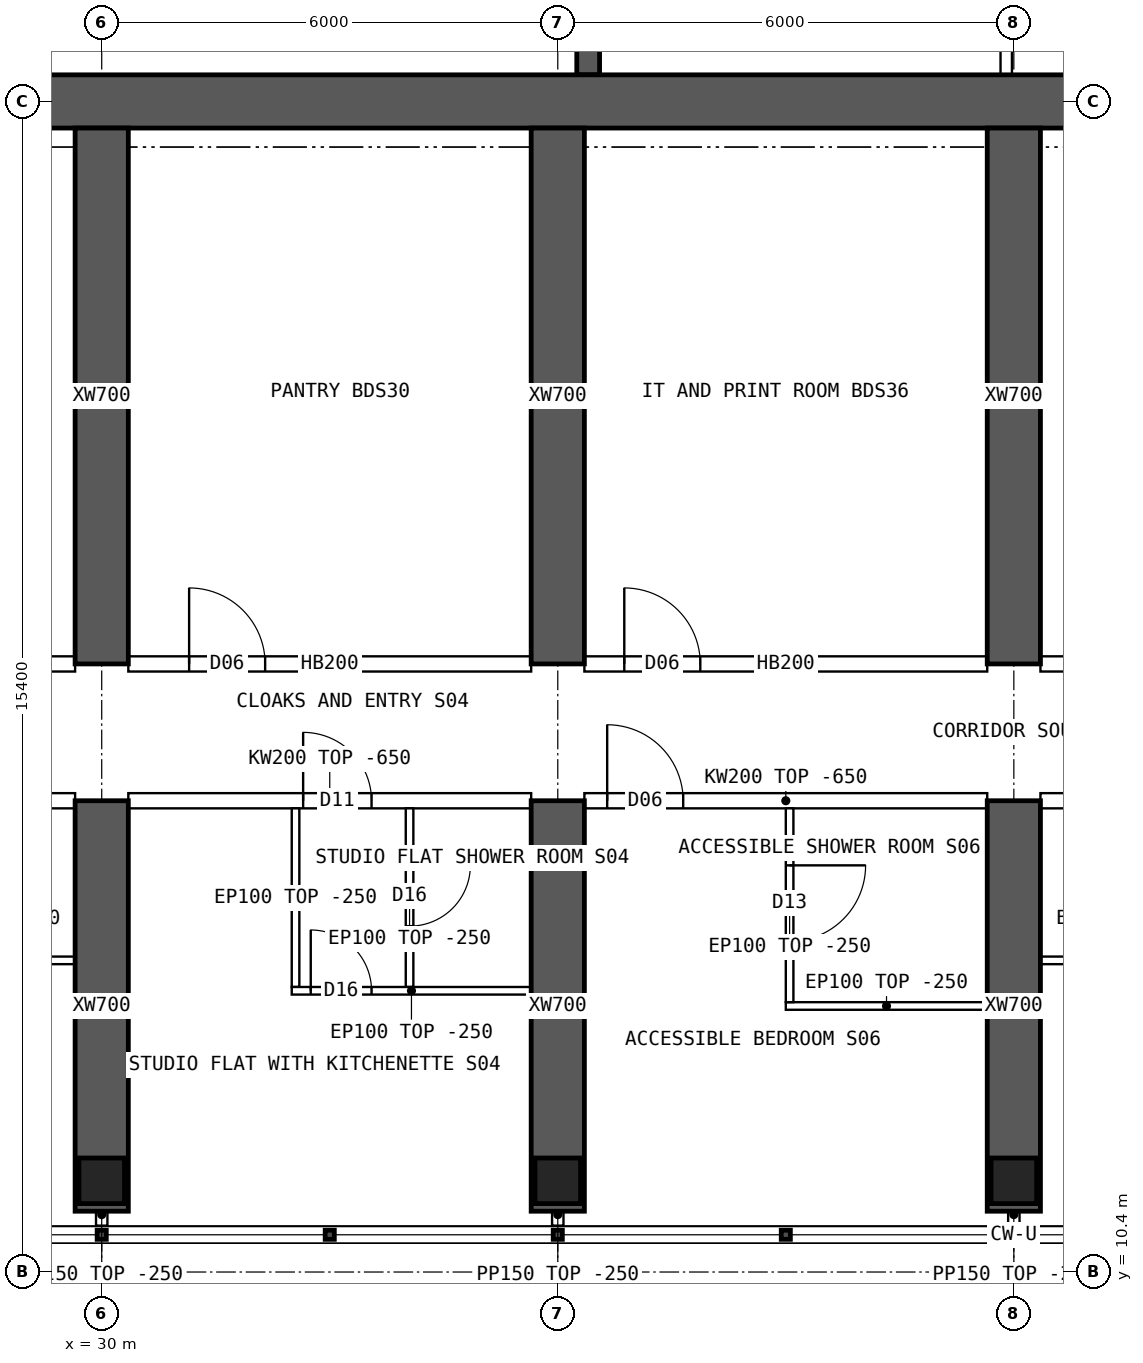
"""IFC4 building model, lengths in metres.
Left out: names, types, materials, properties, quantities, classifications, styles, units other than length and angle.
Written with IfcOpenShell. Run it as: python <this file> out.ifc"""

import sys

from ifc_helpers import new_model, si_unit, direction, frame, frame_2d, origin, origin_2d, place, context, subcontext, project, spatial, polyline, rectangle, hollow_rectangle, outline, extrude, element, fill, save


model = new_model("IFC4")
c1 = context("Model", 3, precision=1e-05, world=origin(), true_north=direction((0.0, 1.0)))
c2 = subcontext(c1, "Body", "Model", "MODEL_VIEW")
j1 = project(units=[si_unit("LENGTHUNIT", "METRE"), si_unit("PLANEANGLEUNIT", "RADIAN")], contexts=[c1])
p1 = place(None, origin())
s1 = spatial("IfcSite", under=j1, at=p1, CompositionType="ELEMENT")
p2 = place(p1, origin())
s2 = spatial("IfcBuilding", under=s1, at=p2, CompositionType="ELEMENT")
p3 = place(p2, frame((0.0, 0.0, 231.55)))
s3 = spatial("IfcBuildingStorey", under=s2, at=p3, CompositionType="ELEMENT", Elevation=231.55)
for number, where, z_axis, x_axis in (
    (1, (30.0, 11.6, 0.0), (0.0, 0.0, 1.0), (1.0, 0.0, 0.0)),
    (2, (36.0, 11.6, 0.0), (0.0, 0.0, 1.0), (1.0, 0.0, 0.0)),
    (3, (42.0, 11.6, 0.0), (0.0, 0.0, 1.0), (1.0, 0.0, 0.0)),
):
    element("IfcColumn", number, at=place(p3, frame(where, z_axis=z_axis, x_axis=x_axis)), inside=s3, PredefinedType="COLUMN", context=c2, shape_type="SweptSolid", body=[
        extrude(hollow_rectangle(XDim=0.6, YDim=0.6, WallThickness=0.06, at=origin_2d()), origin(), (0.0, 0.0, 1.0), 3.75),
    ])
p4 = place(p3, frame((18.0, 25.8, 0.0), z_axis=(0.0, 0.0, 1.0), x_axis=(1.0, 0.0, 0.0)))
e4 = element("IfcWall", 4, at=p4, inside=s3, PredefinedType="SHEAR", context=c2, shape_type="SweptSolid", body=[
    extrude(rectangle(XDim=48.0, YDim=0.7, at=frame_2d((24.0, 0.0))), origin(), (0.0, 0.0, 1.0), 3.75),
])
p5 = place(p3, frame((36.4, 26.15, 0.0), z_axis=(0.0, 0.0, 1.0), x_axis=(0.0, 1.0, 0.0)))
e5 = element("IfcWall", 5, at=p5, inside=s3, PredefinedType="SHEAR", context=c2, shape_type="SweptSolid", body=[
    extrude(rectangle(XDim=4.1, YDim=0.3, at=frame_2d((2.05, 0.0))), origin(), (0.0, 0.0, 1.0), 3.75),
])
p6 = place(p3, frame((30.0, 11.2, 0.0), z_axis=(0.0, 0.0, 1.0), x_axis=(0.0, 1.0, 0.0)))
e6 = element("IfcWall", 6, at=p6, inside=s3, PredefinedType="SHEAR", context=c2, shape_type="SweptSolid", body=[
    extrude(rectangle(XDim=5.4, YDim=0.7, at=frame_2d((2.7, 0.0))), origin(), (0.0, 0.0, 1.0), 3.75),
])
p7 = place(p3, frame((30.0, 18.4, 0.0), z_axis=(0.0, 0.0, 1.0), x_axis=(0.0, 1.0, 0.0)))
e7 = element("IfcWall", 7, at=p7, inside=s3, PredefinedType="SHEAR", context=c2, shape_type="SweptSolid", body=[
    extrude(rectangle(XDim=7.05, YDim=0.7, at=frame_2d((3.525, 0.0))), origin(), (0.0, 0.0, 1.0), 3.75),
])
p8 = place(p3, frame((36.0, 11.2, 0.0), z_axis=(0.0, 0.0, 1.0), x_axis=(0.0, 1.0, 0.0)))
e8 = element("IfcWall", 8, at=p8, inside=s3, PredefinedType="SHEAR", context=c2, shape_type="SweptSolid", body=[
    extrude(rectangle(XDim=5.4, YDim=0.7, at=frame_2d((2.7, 0.0))), origin(), (0.0, 0.0, 1.0), 3.75),
])
p9 = place(p3, frame((36.0, 18.4, 0.0), z_axis=(0.0, 0.0, 1.0), x_axis=(0.0, 1.0, 0.0)))
e9 = element("IfcWall", 9, at=p9, inside=s3, PredefinedType="SHEAR", context=c2, shape_type="SweptSolid", body=[
    extrude(rectangle(XDim=7.05, YDim=0.7, at=frame_2d((3.525, 0.0))), origin(), (0.0, 0.0, 1.0), 3.75),
])
p10 = place(p3, frame((42.0, 11.2, 0.0), z_axis=(0.0, 0.0, 1.0), x_axis=(0.0, 1.0, 0.0)))
e10 = element("IfcWall", 10, at=p10, inside=s3, PredefinedType="SHEAR", context=c2, shape_type="SweptSolid", body=[
    extrude(rectangle(XDim=5.4, YDim=0.7, at=frame_2d((2.7, 0.0))), origin(), (0.0, 0.0, 1.0), 3.75),
])
p11 = place(p3, frame((42.0, 18.4, 0.0), z_axis=(0.0, 0.0, 1.0), x_axis=(0.0, 1.0, 0.0)))
e11 = element("IfcWall", 11, at=p11, inside=s3, PredefinedType="SHEAR", context=c2, shape_type="SweptSolid", body=[
    extrude(rectangle(XDim=7.05, YDim=0.7, at=frame_2d((3.525, 0.0))), origin(), (0.0, 0.0, 1.0), 3.75),
])
p12 = place(p3, frame((41.9, 26.15, 0.0), z_axis=(0.0, 0.0, 1.0), x_axis=(0.0, 1.0, 0.0)))
e12 = element("IfcWall", 12, at=p12, inside=s3, PredefinedType="SOLIDWALL", context=c2, shape_type="SweptSolid", body=[
    extrude(rectangle(XDim=4.1, YDim=0.15, at=frame_2d((2.05, 0.0))), origin(), (0.0, 0.0, 1.0), 3.5),
])
p13 = place(p3, frame((24.35, 16.6, 0.0), z_axis=(0.0, 0.0, 1.0), x_axis=(1.0, 0.0, 0.0)))
e13 = element("IfcWall", 13, at=p13, inside=s3, PredefinedType="SOLIDWALL", context=c2, shape_type="SweptSolid", body=[
    extrude(outline(polyline([(0.0, 0.0), (5.3, 0.0), (5.3, 3.1), (0.0, 3.1), (0.0, 0.0)])), frame((0.0, 0.1, 0.0), z_axis=(0.0, -1.0, 0.0), x_axis=(1.0, 0.0, 0.0)), (0.0, 0.0, 1.0), 0.2),
])
p14 = place(p13, frame((0.1, 0.0, 0.0)))
e14 = element("IfcOpeningElement", 14, at=p14, cuts=e13, PredefinedType="OPENING", context=c2, shape_type="SweptSolid", body=[
    extrude(rectangle(XDim=0.9, YDim=2.1, at=frame_2d((0.45, 1.05))), frame((0.0, 0.11, 0.0), z_axis=(0.0, -1.0, 0.0), x_axis=(1.0, 0.0, 0.0)), (0.0, 0.0, 1.0), 0.22),
])
p15 = place(p3, frame((24.35, 18.4, 0.0), z_axis=(0.0, 0.0, 1.0), x_axis=(1.0, 0.0, 0.0)))
e15 = element("IfcWall", 15, at=p15, inside=s3, PredefinedType="SOLIDWALL", context=c2, shape_type="SweptSolid", body=[
    extrude(rectangle(XDim=5.3, YDim=0.2, at=frame_2d((2.65, 0.0))), origin(), (0.0, 0.0, 1.0), 3.5),
])
p16 = place(p15, frame((0.15, 0.0, 0.0)))
e16 = element("IfcOpeningElement", 16, at=p16, cuts=e15, PredefinedType="OPENING", context=c2, shape_type="SweptSolid", body=[
    extrude(rectangle(XDim=0.9, YDim=2.1, at=frame_2d((0.45, 1.05))), frame((0.0, 0.11, 0.0), z_axis=(0.0, -1.0, 0.0), x_axis=(1.0, 0.0, 0.0)), (0.0, 0.0, 1.0), 0.22),
])
p17 = place(p15, frame((2.22, 0.0, 0.0)))
e17 = element("IfcOpeningElement", 17, at=p17, cuts=e15, PredefinedType="OPENING", context=c2, shape_type="SweptSolid", body=[
    extrude(rectangle(XDim=0.9, YDim=2.1, at=frame_2d((0.45, 1.05))), frame((0.0, 0.11, 0.0), z_axis=(0.0, -1.0, 0.0), x_axis=(1.0, 0.0, 0.0)), (0.0, 0.0, 1.0), 0.22),
])
p18 = place(p3, frame((30.35, 16.6, 0.0), z_axis=(0.0, 0.0, 1.0), x_axis=(1.0, 0.0, 0.0)))
e18 = element("IfcWall", 18, at=p18, inside=s3, PredefinedType="SOLIDWALL", context=c2, shape_type="SweptSolid", body=[
    extrude(outline(polyline([(0.0, 0.0), (5.3, 0.0), (5.3, 3.1), (0.0, 3.1), (0.0, 0.0)])), frame((0.0, 0.1, 0.0), z_axis=(0.0, -1.0, 0.0), x_axis=(1.0, 0.0, 0.0)), (0.0, 0.0, 1.0), 0.2),
])
p19 = place(p18, frame((2.3, 0.0, 0.0)))
e19 = element("IfcOpeningElement", 19, at=p19, cuts=e18, PredefinedType="OPENING", context=c2, shape_type="SweptSolid", body=[
    extrude(rectangle(XDim=0.9, YDim=2.1, at=frame_2d((0.45, 1.05))), frame((0.0, 0.11, 0.0), z_axis=(0.0, -1.0, 0.0), x_axis=(1.0, 0.0, 0.0)), (0.0, 0.0, 1.0), 0.22),
])
p20 = place(p3, frame((30.35, 18.4, 0.0), z_axis=(0.0, 0.0, 1.0), x_axis=(1.0, 0.0, 0.0)))
e20 = element("IfcWall", 20, at=p20, inside=s3, PredefinedType="SOLIDWALL", context=c2, shape_type="SweptSolid", body=[
    extrude(rectangle(XDim=5.3, YDim=0.2, at=frame_2d((2.65, 0.0))), origin(), (0.0, 0.0, 1.0), 3.5),
])
p21 = place(p20, frame((0.8, 0.0, 0.0)))
e21 = element("IfcOpeningElement", 21, at=p21, cuts=e20, PredefinedType="OPENING", context=c2, shape_type="SweptSolid", body=[
    extrude(rectangle(XDim=1.0, YDim=2.1, at=frame_2d((0.5, 1.05))), frame((0.0, 0.11, 0.0), z_axis=(0.0, -1.0, 0.0), x_axis=(1.0, 0.0, 0.0)), (0.0, 0.0, 1.0), 0.22),
])
p22 = place(p3, frame((36.35, 16.6, 0.0), z_axis=(0.0, 0.0, 1.0), x_axis=(1.0, 0.0, 0.0)))
e22 = element("IfcWall", 22, at=p22, inside=s3, PredefinedType="SOLIDWALL", context=c2, shape_type="SweptSolid", body=[
    extrude(outline(polyline([(0.0, 0.0), (5.3, 0.0), (5.3, 3.1), (0.0, 3.1), (0.0, 0.0)])), frame((0.0, 0.1, 0.0), z_axis=(0.0, -1.0, 0.0), x_axis=(1.0, 0.0, 0.0)), (0.0, 0.0, 1.0), 0.2),
])
p23 = place(p22, frame((0.3, 0.0, 0.0)))
e23 = element("IfcOpeningElement", 23, at=p23, cuts=e22, PredefinedType="OPENING", context=c2, shape_type="SweptSolid", body=[
    extrude(rectangle(XDim=1.0, YDim=2.1, at=frame_2d((0.5, 1.05))), frame((0.0, 0.11, 0.0), z_axis=(0.0, -1.0, 0.0), x_axis=(1.0, 0.0, 0.0)), (0.0, 0.0, 1.0), 0.22),
])
p24 = place(p3, frame((36.35, 18.4, 0.0), z_axis=(0.0, 0.0, 1.0), x_axis=(1.0, 0.0, 0.0)))
e24 = element("IfcWall", 24, at=p24, inside=s3, PredefinedType="SOLIDWALL", context=c2, shape_type="SweptSolid", body=[
    extrude(rectangle(XDim=5.3, YDim=0.2, at=frame_2d((2.65, 0.0))), origin(), (0.0, 0.0, 1.0), 3.5),
])
p25 = place(p24, frame((0.525, 0.0, 0.0)))
e25 = element("IfcOpeningElement", 25, at=p25, cuts=e24, PredefinedType="OPENING", context=c2, shape_type="SweptSolid", body=[
    extrude(rectangle(XDim=1.0, YDim=2.1, at=frame_2d((0.5, 1.05))), frame((0.0, 0.11, 0.0), z_axis=(0.0, -1.0, 0.0), x_axis=(1.0, 0.0, 0.0)), (0.0, 0.0, 1.0), 0.22),
])
p26 = place(p3, frame((42.35, 16.6, 0.0), z_axis=(0.0, 0.0, 1.0), x_axis=(1.0, 0.0, 0.0)))
e26 = element("IfcWall", 26, at=p26, inside=s3, PredefinedType="SOLIDWALL", context=c2, shape_type="SweptSolid", body=[
    extrude(outline(polyline([(0.0, 0.0), (5.3, 0.0), (5.3, 3.1), (0.0, 3.1), (0.0, 0.0)])), frame((0.0, 0.1, 0.0), z_axis=(0.0, -1.0, 0.0), x_axis=(1.0, 0.0, 0.0)), (0.0, 0.0, 1.0), 0.2),
])
p27 = place(p26, frame((2.6, 0.0, 0.0)))
e27 = element("IfcOpeningElement", 27, at=p27, cuts=e26, PredefinedType="OPENING", context=c2, shape_type="SweptSolid", body=[
    extrude(rectangle(XDim=0.9, YDim=2.1, at=frame_2d((0.45, 1.05))), frame((0.0, 0.11, 0.0), z_axis=(0.0, -1.0, 0.0), x_axis=(1.0, 0.0, 0.0)), (0.0, 0.0, 1.0), 0.22),
])
p28 = place(p3, frame((42.35, 18.4, 0.0), z_axis=(0.0, 0.0, 1.0), x_axis=(1.0, 0.0, 0.0)))
e28 = element("IfcWall", 28, at=p28, inside=s3, PredefinedType="SOLIDWALL", context=c2, shape_type="SweptSolid", body=[
    extrude(rectangle(XDim=5.3, YDim=0.2, at=frame_2d((2.65, 0.0))), origin(), (0.0, 0.0, 1.0), 3.5),
])
p29 = place(p28, frame((0.35, 0.0, 0.0)))
e29 = element("IfcOpeningElement", 29, at=p29, cuts=e28, PredefinedType="OPENING", context=c2, shape_type="SweptSolid", body=[
    extrude(rectangle(XDim=0.9, YDim=2.1, at=frame_2d((0.45, 1.05))), frame((0.0, 0.11, 0.0), z_axis=(0.0, -1.0, 0.0), x_axis=(1.0, 0.0, 0.0)), (0.0, 0.0, 1.0), 0.22),
])
p30 = place(p28, frame((3.79, 0.0, 0.0)))
e30 = element("IfcOpeningElement", 30, at=p30, cuts=e28, PredefinedType="OPENING", context=c2, shape_type="SweptSolid", body=[
    extrude(rectangle(XDim=0.9, YDim=2.1, at=frame_2d((0.45, 1.05))), frame((0.0, 0.11, 0.0), z_axis=(0.0, -1.0, 0.0), x_axis=(1.0, 0.0, 0.0)), (0.0, 0.0, 1.0), 0.22),
])
p31 = place(p3, frame((29.65, 14.5, 0.0), z_axis=(0.0, 0.0, 1.0), x_axis=(-1.0, 0.0, 0.0)))
e31 = element("IfcWall", 31, at=p31, inside=s3, PredefinedType="PARTITIONING", context=c2, shape_type="SweptSolid", body=[
    extrude(rectangle(XDim=2.55, YDim=0.1, at=frame_2d((1.275, 0.0))), origin(), (0.0, 0.0, 1.0), 3.5),
])
p32 = place(p31, frame((0.825, 0.0, 0.0)))
e32 = element("IfcOpeningElement", 32, at=p32, cuts=e31, PredefinedType="OPENING", context=c2, shape_type="SweptSolid", body=[
    extrude(rectangle(XDim=0.9, YDim=2.1, at=frame_2d((0.45, 1.05))), frame((0.0, 0.06, 0.0), z_axis=(0.0, -1.0, 0.0), x_axis=(1.0, 0.0, 0.0)), (0.0, 0.0, 1.0), 0.12),
])
p33 = place(p3, frame((35.65, 14.1, 0.0), z_axis=(0.0, 0.0, 1.0), x_axis=(-1.0, 0.0, 0.0)))
e33 = element("IfcWall", 33, at=p33, inside=s3, PredefinedType="PARTITIONING", context=c2, shape_type="SweptSolid", body=[
    extrude(rectangle(XDim=3.15, YDim=0.1, at=frame_2d((1.575, 0.0))), origin(), (0.0, 0.0, 1.0), 3.5),
])
p34 = place(p33, frame((2.1, 0.0, 0.0)))
e34 = element("IfcOpeningElement", 34, at=p34, cuts=e33, PredefinedType="OPENING", context=c2, shape_type="SweptSolid", body=[
    extrude(rectangle(XDim=0.8, YDim=2.1, at=frame_2d((0.4, 1.05))), frame((0.0, 0.06, 0.0), z_axis=(0.0, -1.0, 0.0), x_axis=(1.0, 0.0, 0.0)), (0.0, 0.0, 1.0), 0.12),
])
p35 = place(p3, frame((32.55, 14.15, 0.0), z_axis=(0.0, 0.0, 1.0), x_axis=(0.0, 1.0, 0.0)))
e35 = element("IfcWall", 35, at=p35, inside=s3, PredefinedType="PARTITIONING", context=c2, shape_type="SweptSolid", body=[
    extrude(outline(polyline([(0.0, 0.0), (2.35, 0.0), (2.35, 3.1), (2.302, 3.1), (2.3, 3.5), (0.0, 3.5), (0.0, 0.0)])), frame((0.0, 0.05, 0.0), z_axis=(0.0, -1.0, 0.0), x_axis=(1.0, 0.0, 0.0)), (0.0, 0.0, 1.0), 0.1),
])
p36 = place(p3, frame((34.05, 14.15, 0.0), z_axis=(0.0, 0.0, 1.0), x_axis=(0.0, 1.0, 0.0)))
e36 = element("IfcWall", 36, at=p36, inside=s3, PredefinedType="PARTITIONING", context=c2, shape_type="SweptSolid", body=[
    extrude(outline(polyline([(0.0, 0.0), (2.35, 0.0), (2.35, 3.1), (2.302, 3.1), (2.3, 3.5), (0.0, 3.5), (0.0, 0.0)])), frame((0.0, 0.05, 0.0), z_axis=(0.0, -1.0, 0.0), x_axis=(1.0, 0.0, 0.0)), (0.0, 0.0, 1.0), 0.1),
])
p37 = place(p36, frame((0.8, 0.0, 0.0)))
e37 = element("IfcOpeningElement", 37, at=p37, cuts=e36, PredefinedType="OPENING", context=c2, shape_type="SweptSolid", body=[
    extrude(rectangle(XDim=0.8, YDim=2.1, at=frame_2d((0.4, 1.05))), frame((0.0, 0.06, 0.0), z_axis=(0.0, -1.0, 0.0), x_axis=(1.0, 0.0, 0.0)), (0.0, 0.0, 1.0), 0.12),
])
p38 = place(p3, frame((39.0, 13.9, 0.0), z_axis=(0.0, 0.0, 1.0), x_axis=(1.0, 0.0, 0.0)))
e38 = element("IfcWall", 38, at=p38, inside=s3, PredefinedType="PARTITIONING", context=c2, shape_type="SweptSolid", body=[
    extrude(rectangle(XDim=2.65, YDim=0.1, at=frame_2d((1.325, 0.0))), origin(), (0.0, 0.0, 1.0), 3.5),
])
p39 = place(p3, frame((39.05, 13.95, 0.0), z_axis=(0.0, 0.0, 1.0), x_axis=(0.0, 1.0, 0.0)))
e39 = element("IfcWall", 39, at=p39, inside=s3, PredefinedType="PARTITIONING", context=c2, shape_type="SweptSolid", body=[
    extrude(outline(polyline([(0.0, 0.0), (2.55, 0.0), (2.55, 3.1), (2.502, 3.1), (2.5, 3.5), (0.0, 3.5), (0.0, 0.0)])), frame((0.0, 0.05, 0.0), z_axis=(0.0, -1.0, 0.0), x_axis=(1.0, 0.0, 0.0)), (0.0, 0.0, 1.0), 0.1),
])
p40 = place(p39, frame((0.8, 0.0, 0.0)))
e40 = element("IfcOpeningElement", 40, at=p40, cuts=e39, PredefinedType="OPENING", context=c2, shape_type="SweptSolid", body=[
    extrude(rectangle(XDim=1.0, YDim=2.1, at=frame_2d((0.5, 1.05))), frame((0.0, 0.06, 0.0), z_axis=(0.0, -1.0, 0.0), x_axis=(1.0, 0.0, 0.0)), (0.0, 0.0, 1.0), 0.12),
])
p41 = place(p3, frame((44.9, 14.5, 0.0), z_axis=(0.0, 0.0, 1.0), x_axis=(-1.0, 0.0, 0.0)))
e41 = element("IfcWall", 41, at=p41, inside=s3, PredefinedType="PARTITIONING", context=c2, shape_type="SweptSolid", body=[
    extrude(rectangle(XDim=2.55, YDim=0.1, at=frame_2d((1.275, 0.0))), origin(), (0.0, 0.0, 1.0), 3.5),
])
p42 = place(p41, frame((0.825, 0.0, 0.0)))
e42 = element("IfcOpeningElement", 42, at=p42, cuts=e41, PredefinedType="OPENING", context=c2, shape_type="SweptSolid", body=[
    extrude(rectangle(XDim=0.9, YDim=2.1, at=frame_2d((0.45, 1.05))), frame((0.0, 0.06, 0.0), z_axis=(0.0, -1.0, 0.0), x_axis=(1.0, 0.0, 0.0)), (0.0, 0.0, 1.0), 0.12),
])
for number, where, z_axis, x_axis in (
    (43, (30.0, 11.3, 0.0), (0.0, 0.0, 1.0), (0.0, -1.0, 0.0)),
    (44, (36.0, 11.3, 0.0), (0.0, 0.0, 1.0), (0.0, -1.0, 0.0)),
    (45, (42.0, 11.3, 0.0), (0.0, 0.0, 1.0), (0.0, -1.0, 0.0)),
):
    element("IfcWall", number, at=place(p3, frame(where, z_axis=z_axis, x_axis=x_axis)), inside=s3, PredefinedType="PARTITIONING", context=c2, shape_type="SweptSolid", body=[
        extrude(rectangle(XDim=0.29, YDim=0.15, at=frame_2d((0.145, 0.0))), origin(), (0.0, 0.0, 1.0), 3.5),
    ])
p43 = place(p34, origin())
e46 = element("IfcDoor", 46, at=p43, inside=s3, OperationType="SINGLE_SWING_RIGHT", PredefinedType="DOOR", context=c2, shape_type="SweptSolid", body=[
    extrude(rectangle(XDim=0.8, YDim=2.1, at=frame_2d((0.4, 1.05))), frame((0.0, 0.025, 0.0), z_axis=(0.0, -1.0, 0.0), x_axis=(1.0, 0.0, 0.0)), (0.0, 0.0, 1.0), 0.05),
])
fill(e34, e46)
p44 = place(p37, origin())
e47 = element("IfcDoor", 47, at=p44, inside=s3, OperationType="SINGLE_SWING_RIGHT", PredefinedType="DOOR", context=c2, shape_type="SweptSolid", body=[
    extrude(rectangle(XDim=0.8, YDim=2.1, at=frame_2d((0.4, 1.05))), frame((0.0, 0.025, 0.0), z_axis=(0.0, -1.0, 0.0), x_axis=(1.0, 0.0, 0.0)), (0.0, 0.0, 1.0), 0.05),
])
fill(e37, e47)
p45 = place(p19, origin())
e48 = element("IfcDoor", 48, at=p45, inside=s3, OperationType="SINGLE_SWING_LEFT", PredefinedType="DOOR", context=c2, shape_type="SweptSolid", body=[
    extrude(rectangle(XDim=0.9, YDim=2.1, at=frame_2d((0.45, 1.05))), frame((0.0, 0.025, 0.0), z_axis=(0.0, -1.0, 0.0), x_axis=(1.0, 0.0, 0.0)), (0.0, 0.0, 1.0), 0.05),
])
fill(e19, e48)
p46 = place(p40, origin())
e49 = element("IfcDoor", 49, at=p46, inside=s3, OperationType="SINGLE_SWING_RIGHT", PredefinedType="DOOR", context=c2, shape_type="SweptSolid", body=[
    extrude(rectangle(XDim=1.0, YDim=2.1, at=frame_2d((0.5, 1.05))), frame((0.0, 0.025, 0.0), z_axis=(0.0, -1.0, 0.0), x_axis=(1.0, 0.0, 0.0)), (0.0, 0.0, 1.0), 0.05),
])
fill(e40, e49)
p47 = place(p23, origin())
e50 = element("IfcDoor", 50, at=p47, inside=s3, OperationType="SINGLE_SWING_LEFT", PredefinedType="DOOR", context=c2, shape_type="SweptSolid", body=[
    extrude(rectangle(XDim=1.0, YDim=2.1, at=frame_2d((0.5, 1.05))), frame((0.0, 0.025, 0.0), z_axis=(0.0, -1.0, 0.0), x_axis=(1.0, 0.0, 0.0)), (0.0, 0.0, 1.0), 0.05),
])
fill(e23, e50)
p48 = place(p21, origin())
e51 = element("IfcDoor", 51, at=p48, inside=s3, OperationType="SINGLE_SWING_LEFT", PredefinedType="DOOR", context=c2, shape_type="SweptSolid", body=[
    extrude(rectangle(XDim=1.0, YDim=2.1, at=frame_2d((0.5, 1.05))), frame((0.0, 0.025, 0.0), z_axis=(0.0, -1.0, 0.0), x_axis=(1.0, 0.0, 0.0)), (0.0, 0.0, 1.0), 0.05),
])
fill(e21, e51)
p49 = place(p25, origin())
e52 = element("IfcDoor", 52, at=p49, inside=s3, OperationType="SINGLE_SWING_LEFT", PredefinedType="DOOR", context=c2, shape_type="SweptSolid", body=[
    extrude(rectangle(XDim=1.0, YDim=2.1, at=frame_2d((0.5, 1.05))), frame((0.0, 0.025, 0.0), z_axis=(0.0, -1.0, 0.0), x_axis=(1.0, 0.0, 0.0)), (0.0, 0.0, 1.0), 0.05),
])
fill(e25, e52)
save(model, sys.argv[1])
